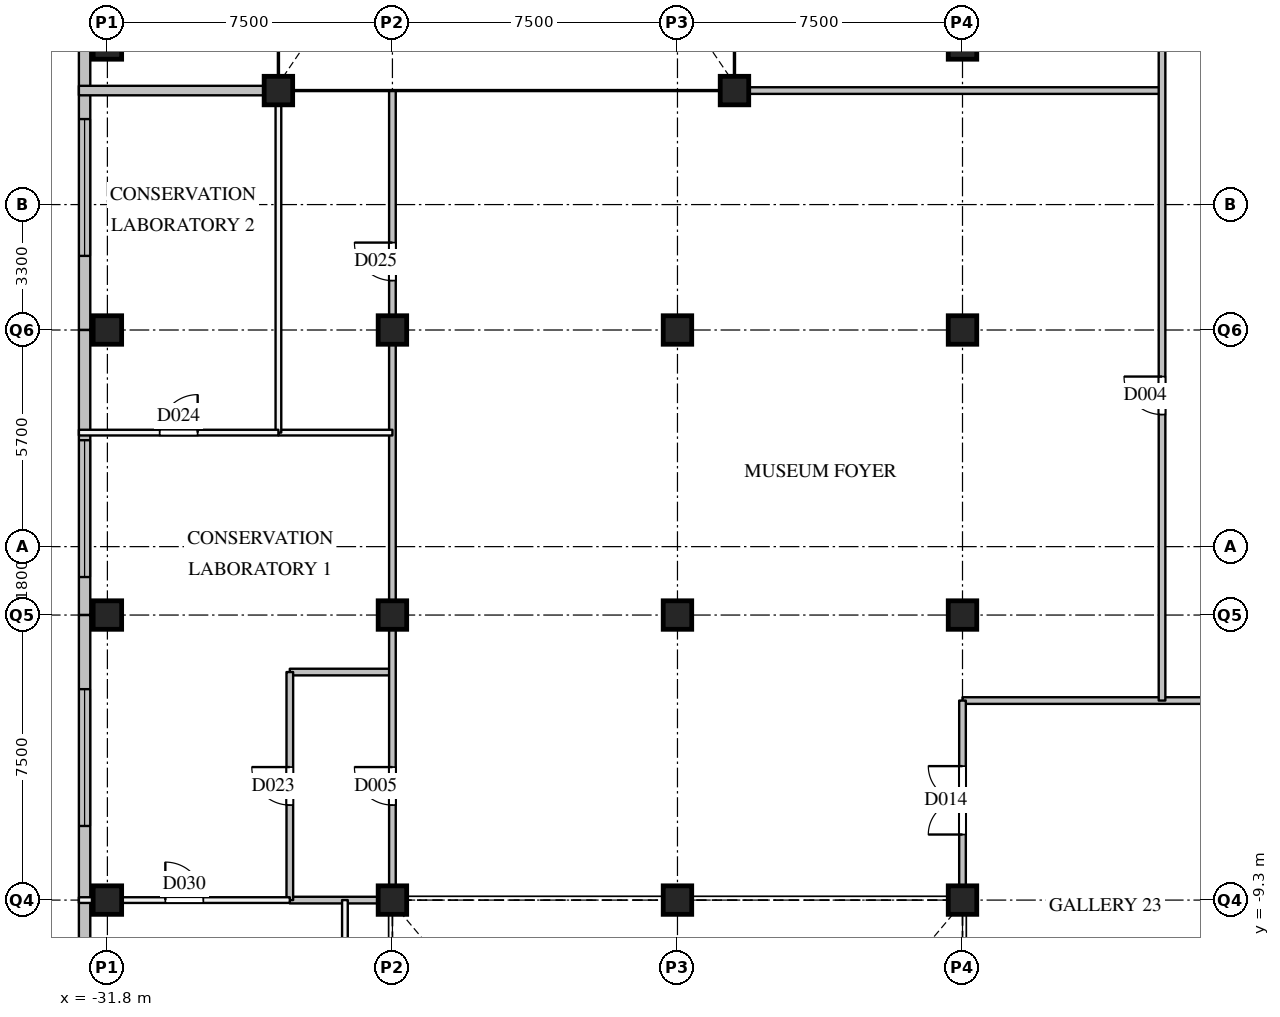
"""IFC4 building model, lengths in metres.
Left out: names, types, materials, properties, quantities, classifications, styles, units other than length and angle.
Written with IfcOpenShell. Run it as: python <this file> out.ifc"""

import sys

from ifc_helpers import new_model, si_unit, direction, frame, frame_2d, origin, origin_2d, place, context, subcontext, project, spatial, rectangle, extrude, element, fill, save


model = new_model("IFC4")
c1 = context("Model", 3, precision=1e-05, world=origin(), true_north=direction((0.0, 1.0)))
c2 = subcontext(c1, "Body", "Model", "MODEL_VIEW")
j1 = project(units=[si_unit("LENGTHUNIT", "METRE"), si_unit("PLANEANGLEUNIT", "RADIAN")], contexts=[c1])
p1 = place(None, origin())
s1 = spatial("IfcSite", under=j1, at=p1, CompositionType="ELEMENT")
p2 = place(p1, origin())
s2 = spatial("IfcBuilding", under=s1, at=p2, CompositionType="ELEMENT")
p3 = place(p2, frame((0.0, 0.0, 21.0)))
s3 = spatial("IfcBuildingStorey", under=s2, at=p3, CompositionType="ELEMENT", Elevation=21.0)
for number, where, z_axis, x_axis in (
    (1, (-31.8, -9.3, 0.0), (0.0, 0.0, 1.0), (1.0, 0.0, 0.0)),
    (2, (-31.8, -1.8, 0.0), (0.0, 0.0, 1.0), (1.0, 0.0, 0.0)),
    (3, (-31.8, 5.7, 0.0), (0.0, 0.0, 1.0), (1.0, 0.0, 0.0)),
    (4, (-31.8, 13.2, 0.0), (0.0, 0.0, 1.0), (1.0, 0.0, 0.0)),
    (5, (-24.3, -9.3, 0.0), (0.0, 0.0, 1.0), (1.0, 0.0, 0.0)),
    (6, (-24.3, -1.8, 0.0), (0.0, 0.0, 1.0), (1.0, 0.0, 0.0)),
    (7, (-24.3, 5.7, 0.0), (0.0, 0.0, 1.0), (1.0, 0.0, 0.0)),
    (8, (-16.8, -9.3, 0.0), (0.0, 0.0, 1.0), (1.0, 0.0, 0.0)),
    (9, (-16.8, -1.8, 0.0), (0.0, 0.0, 1.0), (1.0, 0.0, 0.0)),
    (10, (-16.8, 5.7, 0.0), (0.0, 0.0, 1.0), (1.0, 0.0, 0.0)),
    (11, (-9.3, -9.3, 0.0), (0.0, 0.0, 1.0), (1.0, 0.0, 0.0)),
    (12, (-9.3, -1.8, 0.0), (0.0, 0.0, 1.0), (1.0, 0.0, 0.0)),
    (13, (-9.3, 5.7, 0.0), (0.0, 0.0, 1.0), (1.0, 0.0, 0.0)),
    (14, (-9.3, 13.2, 0.0), (0.0, 0.0, 1.0), (1.0, 0.0, 0.0)),
    (15, (-27.3, 12.0, 0.0), (0.0, 0.0, 1.0), (1.0, 0.0, 0.0)),
    (16, (-15.3, 12.0, 0.0), (0.0, 0.0, 1.0), (1.0, 0.0, 0.0)),
):
    element("IfcColumn", number, at=place(p3, frame(where, z_axis=z_axis, x_axis=x_axis)), inside=s3, PredefinedType="COLUMN", context=c2, shape_type="SweptSolid", body=[
        extrude(rectangle(XDim=0.75, YDim=0.75, at=origin_2d()), origin(), (0.0, 0.0, 1.0), 5.0),
    ])
p4 = place(p3, frame((-32.4, 13.2, 0.0), z_axis=(0.0, 0.0, 1.0), x_axis=(0.0, -1.0, 0.0)))
e17 = element("IfcWall", 17, at=p4, inside=s3, PredefinedType="SOLIDWALL", context=c2, shape_type="SweptSolid", body=[
    extrude(rectangle(XDim=7.5, YDim=0.3, at=frame_2d((3.75, 0.0))), origin(), (0.0, 0.0, 1.0), 4.59),
])
p5 = place(p4, frame((1.95, 0.0, 2.4)))
e18 = element("IfcOpeningElement", 18, at=p5, cuts=e17, PredefinedType="OPENING", context=c2, shape_type="SweptSolid", body=[
    extrude(rectangle(XDim=3.6, YDim=1.2, at=frame_2d((1.8, 0.6))), frame((0.0, 0.16, 0.0), z_axis=(0.0, -1.0, 0.0), x_axis=(1.0, 0.0, 0.0)), (0.0, 0.0, 1.0), 0.32),
])
p6 = place(p3, frame((-32.4, 5.7, 0.0), z_axis=(0.0, 0.0, 1.0), x_axis=(0.0, -1.0, 0.0)))
e19 = element("IfcWall", 19, at=p6, inside=s3, PredefinedType="SOLIDWALL", context=c2, shape_type="SweptSolid", body=[
    extrude(rectangle(XDim=7.5, YDim=0.3, at=frame_2d((3.75, 0.0))), origin(), (0.0, 0.0, 1.0), 4.59),
])
p7 = place(p6, frame((2.9, 0.0, 2.4)))
e20 = element("IfcOpeningElement", 20, at=p7, cuts=e19, PredefinedType="OPENING", context=c2, shape_type="SweptSolid", body=[
    extrude(rectangle(XDim=3.6, YDim=1.2, at=frame_2d((1.8, 0.6))), frame((0.0, 0.16, 0.0), z_axis=(0.0, -1.0, 0.0), x_axis=(1.0, 0.0, 0.0)), (0.0, 0.0, 1.0), 0.32),
])
p8 = place(p3, frame((-32.4, -1.8, 0.0), z_axis=(0.0, 0.0, 1.0), x_axis=(0.0, -1.0, 0.0)))
e21 = element("IfcWall", 21, at=p8, inside=s3, PredefinedType="SOLIDWALL", context=c2, shape_type="SweptSolid", body=[
    extrude(rectangle(XDim=7.5, YDim=0.3, at=frame_2d((3.75, 0.0))), origin(), (0.0, 0.0, 1.0), 4.59),
])
p9 = place(p8, frame((1.95, 0.0, 2.4)))
e22 = element("IfcOpeningElement", 22, at=p9, cuts=e21, PredefinedType="OPENING", context=c2, shape_type="SweptSolid", body=[
    extrude(rectangle(XDim=3.6, YDim=1.2, at=frame_2d((1.8, 0.6))), frame((0.0, 0.16, 0.0), z_axis=(0.0, -1.0, 0.0), x_axis=(1.0, 0.0, 0.0)), (0.0, 0.0, 1.0), 0.32),
])
p10 = place(p3, frame((-32.4, -9.3, 0.0), z_axis=(0.0, 0.0, 1.0), x_axis=(0.0, -1.0, 0.0)))
e23 = element("IfcWall", 23, at=p10, inside=s3, PredefinedType="SOLIDWALL", context=c2, shape_type="SweptSolid", body=[
    extrude(rectangle(XDim=7.5, YDim=0.3, at=frame_2d((3.75, 0.0))), origin(), (0.0, 0.0, 1.0), 4.59),
])
p11 = place(p10, frame((1.95, 0.0, 2.4)))
e24 = element("IfcOpeningElement", 24, at=p11, cuts=e23, PredefinedType="OPENING", context=c2, shape_type="SweptSolid", body=[
    extrude(rectangle(XDim=3.6, YDim=1.2, at=frame_2d((1.8, 0.6))), frame((0.0, 0.16, 0.0), z_axis=(0.0, -1.0, 0.0), x_axis=(1.0, 0.0, 0.0)), (0.0, 0.0, 1.0), 0.32),
])
p12 = place(p3, frame((-27.0, -9.3, 0.0), z_axis=(0.0, 0.0, 1.0), x_axis=(1.0, 0.0, 0.0)))
e25 = element("IfcWall", 25, at=p12, inside=s3, PredefinedType="PARTITIONING", context=c2, shape_type="SweptSolid", body=[
    extrude(rectangle(XDim=2.7, YDim=0.175, at=frame_2d((1.35, 0.0))), origin(), (0.0, 0.0, 1.0), 3.79),
])
p13 = place(p3, frame((-9.3, -4.05, 0.0), z_axis=(0.0, 0.0, 1.0), x_axis=(1.0, 0.0, 0.0)))
e26 = element("IfcWall", 26, at=p13, inside=s3, PredefinedType="PARTITIONING", context=c2, shape_type="SweptSolid", body=[
    extrude(rectangle(XDim=23.25, YDim=0.175, at=frame_2d((11.625, 0.0))), origin(), (0.0, 0.0, 1.0), 3.79),
])
p14 = place(p13, frame((16.725, 0.0, 0.0)))
e27 = element("IfcOpeningElement", 27, at=p14, cuts=e26, PredefinedType="OPENING", context=c2, shape_type="SweptSolid", body=[
    extrude(rectangle(XDim=1.8, YDim=2.1, at=frame_2d((0.9, 1.05))), frame((0.0, 0.097, 0.0), z_axis=(0.0, -1.0, 0.0), x_axis=(1.0, 0.0, 0.0)), (0.0, 0.0, 1.0), 0.195),
])
p15 = place(p3, frame((-27.0, -3.3, 0.0), z_axis=(0.0, 0.0, 1.0), x_axis=(1.0, 0.0, 0.0)))
e28 = element("IfcWall", 28, at=p15, inside=s3, PredefinedType="PARTITIONING", context=c2, shape_type="SweptSolid", body=[
    extrude(rectangle(XDim=2.7, YDim=0.175, at=frame_2d((1.35, 0.0))), origin(), (0.0, 0.0, 1.0), 3.79),
])
p16 = place(p3, frame((-15.3, 12.0, 0.0), z_axis=(0.0, 0.0, 1.0), x_axis=(1.0, 0.0, 0.0)))
e29 = element("IfcWall", 29, at=p16, inside=s3, PredefinedType="PARTITIONING", context=c2, shape_type="SweptSolid", body=[
    extrude(rectangle(XDim=11.25, YDim=0.175, at=frame_2d((5.625, 0.0))), origin(), (0.0, 0.0, 1.0), 3.79),
])
p17 = place(p3, frame((-27.0, -9.3, 0.0), z_axis=(0.0, 0.0, 1.0), x_axis=(0.0, 1.0, 0.0)))
e30 = element("IfcWall", 30, at=p17, inside=s3, PredefinedType="PARTITIONING", context=c2, shape_type="SweptSolid", body=[
    extrude(rectangle(XDim=6.0, YDim=0.175, at=frame_2d((3.0, 0.0))), origin(), (0.0, 0.0, 1.0), 3.79),
])
p18 = place(p17, frame((2.5, 0.0, 0.0)))
e31 = element("IfcOpeningElement", 31, at=p18, cuts=e30, PredefinedType="OPENING", context=c2, shape_type="SweptSolid", body=[
    extrude(rectangle(XDim=1.0, YDim=2.1, at=frame_2d((0.5, 1.05))), frame((0.0, 0.097, 0.0), z_axis=(0.0, -1.0, 0.0), x_axis=(1.0, 0.0, 0.0)), (0.0, 0.0, 1.0), 0.195),
])
p19 = place(p3, frame((-24.3, -9.3, 0.0), z_axis=(0.0, 0.0, 1.0), x_axis=(0.0, 1.0, 0.0)))
e32 = element("IfcWall", 32, at=p19, inside=s3, PredefinedType="PARTITIONING", context=c2, shape_type="SweptSolid", body=[
    extrude(rectangle(XDim=21.3, YDim=0.175, at=frame_2d((10.65, 0.0))), origin(), (0.0, 0.0, 1.0), 3.79),
])
p20 = place(p19, frame((2.5, 0.0, 0.0)))
e33 = element("IfcOpeningElement", 33, at=p20, cuts=e32, PredefinedType="OPENING", context=c2, shape_type="SweptSolid", body=[
    extrude(rectangle(XDim=1.0, YDim=2.1, at=frame_2d((0.5, 1.05))), frame((0.0, 0.097, 0.0), z_axis=(0.0, -1.0, 0.0), x_axis=(1.0, 0.0, 0.0)), (0.0, 0.0, 1.0), 0.195),
])
p21 = place(p19, frame((16.3, 0.0, 0.0)))
e34 = element("IfcOpeningElement", 34, at=p21, cuts=e32, PredefinedType="OPENING", context=c2, shape_type="SweptSolid", body=[
    extrude(rectangle(XDim=1.0, YDim=2.1, at=frame_2d((0.5, 1.05))), frame((0.0, 0.097, 0.0), z_axis=(0.0, -1.0, 0.0), x_axis=(1.0, 0.0, 0.0)), (0.0, 0.0, 1.0), 0.195),
])
p22 = place(p3, frame((-9.3, -9.3, 0.0), z_axis=(0.0, 0.0, 1.0), x_axis=(0.0, 1.0, 0.0)))
e35 = element("IfcWall", 35, at=p22, inside=s3, PredefinedType="PARTITIONING", context=c2, shape_type="SweptSolid", body=[
    extrude(rectangle(XDim=5.25, YDim=0.175, at=frame_2d((2.625, 0.0))), origin(), (0.0, 0.0, 1.0), 3.79),
])
p23 = place(p22, frame((1.725, 0.0, 0.0)))
e36 = element("IfcOpeningElement", 36, at=p23, cuts=e35, PredefinedType="OPENING", context=c2, shape_type="SweptSolid", body=[
    extrude(rectangle(XDim=1.8, YDim=2.1, at=frame_2d((0.9, 1.05))), frame((0.0, 0.097, 0.0), z_axis=(0.0, -1.0, 0.0), x_axis=(1.0, 0.0, 0.0)), (0.0, 0.0, 1.0), 0.195),
])
p24 = place(p3, frame((-4.05, -4.05, 0.0), z_axis=(0.0, 0.0, 1.0), x_axis=(0.0, 1.0, 0.0)))
e37 = element("IfcWall", 37, at=p24, inside=s3, PredefinedType="PARTITIONING", context=c2, shape_type="SweptSolid", body=[
    extrude(rectangle(XDim=63.0, YDim=0.175, at=frame_2d((31.5, 0.0))), origin(), (0.0, 0.0, 1.0), 3.79),
])
p25 = place(p24, frame((52.45, 0.0, 0.0)))
e38 = element("IfcOpeningElement", 38, at=p25, cuts=e37, PredefinedType="OPENING", context=c2, shape_type="SweptSolid", body=[
    extrude(rectangle(XDim=1.0, YDim=2.1, at=frame_2d((0.5, 1.05))), frame((0.0, 0.097, 0.0), z_axis=(0.0, -1.0, 0.0), x_axis=(1.0, 0.0, 0.0)), (0.0, 0.0, 1.0), 0.195),
])
p26 = place(p24, frame((7.525, 0.0, 0.0)))
e39 = element("IfcOpeningElement", 39, at=p26, cuts=e37, PredefinedType="OPENING", context=c2, shape_type="SweptSolid", body=[
    extrude(rectangle(XDim=1.0, YDim=2.1, at=frame_2d((0.5, 1.05))), frame((0.0, 0.097, 0.0), z_axis=(0.0, -1.0, 0.0), x_axis=(1.0, 0.0, 0.0)), (0.0, 0.0, 1.0), 0.195),
])
p27 = place(p24, frame((21.05, 0.0, 0.0)))
e40 = element("IfcOpeningElement", 40, at=p27, cuts=e37, PredefinedType="OPENING", context=c2, shape_type="SweptSolid", body=[
    extrude(rectangle(XDim=1.8, YDim=2.1, at=frame_2d((0.9, 1.05))), frame((0.0, 0.097, 0.0), z_axis=(0.0, -1.0, 0.0), x_axis=(1.0, 0.0, 0.0)), (0.0, 0.0, 1.0), 0.195),
])
p28 = place(p24, frame((32.85, 0.0, 0.0)))
e41 = element("IfcOpeningElement", 41, at=p28, cuts=e37, PredefinedType="OPENING", context=c2, shape_type="SweptSolid", body=[
    extrude(rectangle(XDim=1.8, YDim=2.1, at=frame_2d((0.9, 1.05))), frame((0.0, 0.097, 0.0), z_axis=(0.0, -1.0, 0.0), x_axis=(1.0, 0.0, 0.0)), (0.0, 0.0, 1.0), 0.195),
])
p29 = place(p24, frame((44.65, 0.0, 0.0)))
e42 = element("IfcOpeningElement", 42, at=p29, cuts=e37, PredefinedType="OPENING", context=c2, shape_type="SweptSolid", body=[
    extrude(rectangle(XDim=1.8, YDim=2.1, at=frame_2d((0.9, 1.05))), frame((0.0, 0.097, 0.0), z_axis=(0.0, -1.0, 0.0), x_axis=(1.0, 0.0, 0.0)), (0.0, 0.0, 1.0), 0.195),
])
p30 = place(p3, frame((-27.3, 3.0, 0.0), z_axis=(0.0, 0.0, 1.0), x_axis=(1.0, 0.0, 0.0)))
e43 = element("IfcWall", 43, at=p30, inside=s3, PredefinedType="PARTITIONING", context=c2, shape_type="SweptSolid", body=[
    extrude(rectangle(XDim=3.0, YDim=0.15, at=frame_2d((1.5, 0.0))), origin(), (0.0, 0.0, 1.0), 3.79),
])
p31 = place(p3, frame((-27.3, 3.0, 0.0), z_axis=(0.0, 0.0, 1.0), x_axis=(0.0, 1.0, 0.0)))
e44 = element("IfcWall", 44, at=p31, inside=s3, PredefinedType="PARTITIONING", context=c2, shape_type="SweptSolid", body=[
    extrude(rectangle(XDim=9.0, YDim=0.15, at=frame_2d((4.5, 0.0))), origin(), (0.0, 0.0, 1.0), 3.79),
])
p32 = place(p3, frame((-32.55, -9.3, 0.0), z_axis=(0.0, 0.0, 1.0), x_axis=(1.0, 0.0, 0.0)))
e45 = element("IfcWall", 45, at=p32, inside=s3, PredefinedType="PARTITIONING", context=c2, shape_type="SweptSolid", body=[
    extrude(rectangle(XDim=5.55, YDim=0.15, at=frame_2d((2.775, 0.0))), origin(), (0.0, 0.0, 1.0), 3.79),
])
p33 = place(p32, frame((2.275, 0.0, 0.0)))
e46 = element("IfcOpeningElement", 46, at=p33, cuts=e45, PredefinedType="OPENING", context=c2, shape_type="SweptSolid", body=[
    extrude(rectangle(XDim=1.0, YDim=2.1, at=frame_2d((0.5, 1.05))), frame((0.0, 0.085, 0.0), z_axis=(0.0, -1.0, 0.0), x_axis=(1.0, 0.0, 0.0)), (0.0, 0.0, 1.0), 0.17),
])
p34 = place(p3, frame((-32.55, 3.0, 0.0), z_axis=(0.0, 0.0, 1.0), x_axis=(1.0, 0.0, 0.0)))
e47 = element("IfcWall", 47, at=p34, inside=s3, PredefinedType="PARTITIONING", context=c2, shape_type="SweptSolid", body=[
    extrude(rectangle(XDim=5.25, YDim=0.15, at=frame_2d((2.625, 0.0))), origin(), (0.0, 0.0, 1.0), 3.79),
])
p35 = place(p34, frame((2.125, 0.0, 0.0)))
e48 = element("IfcOpeningElement", 48, at=p35, cuts=e47, PredefinedType="OPENING", context=c2, shape_type="SweptSolid", body=[
    extrude(rectangle(XDim=1.0, YDim=2.1, at=frame_2d((0.5, 1.05))), frame((0.0, 0.085, 0.0), z_axis=(0.0, -1.0, 0.0), x_axis=(1.0, 0.0, 0.0)), (0.0, 0.0, 1.0), 0.17),
])
p36 = place(p3, frame((-25.55, -20.95, 0.0), z_axis=(0.0, 0.0, 1.0), x_axis=(0.0, 1.0, 0.0)))
e49 = element("IfcWall", 49, at=p36, inside=s3, PredefinedType="PARTITIONING", context=c2, shape_type="SweptSolid", body=[
    extrude(rectangle(XDim=11.65, YDim=0.15, at=frame_2d((5.825, 0.0))), origin(), (0.0, 0.0, 1.0), 3.79),
])
p37 = place(p36, frame((5.325, 0.0, 0.0)))
e50 = element("IfcOpeningElement", 50, at=p37, cuts=e49, PredefinedType="OPENING", context=c2, shape_type="SweptSolid", body=[
    extrude(rectangle(XDim=1.0, YDim=2.1, at=frame_2d((0.5, 1.05))), frame((0.0, 0.085, 0.0), z_axis=(0.0, -1.0, 0.0), x_axis=(1.0, 0.0, 0.0)), (0.0, 0.0, 1.0), 0.17),
])
p38 = place(p3, frame((-32.55, 12.0, 0.0), z_axis=(0.0, 0.0, 1.0), x_axis=(1.0, 0.0, 0.0)))
e51 = element("IfcWall", 51, at=p38, inside=s3, PredefinedType="PARTITIONING", context=c2, shape_type="SweptSolid", body=[
    extrude(rectangle(XDim=5.25, YDim=0.25, at=frame_2d((2.625, 0.0))), origin(), (0.0, 0.0, 1.0), 3.79),
])
p39 = place(p5, origin())
e52 = element("IfcWindow", 52, at=p39, inside=s3, PartitioningType="SINGLE_PANEL", PredefinedType="WINDOW", context=c2, shape_type="SweptSolid", body=[
    extrude(rectangle(XDim=3.6, YDim=1.2, at=frame_2d((1.8, 0.6))), frame((0.0, 0.03, 0.0), z_axis=(0.0, -1.0, 0.0), x_axis=(1.0, 0.0, 0.0)), (0.0, 0.0, 1.0), 0.06),
])
fill(e18, e52)
p40 = place(p7, origin())
e53 = element("IfcWindow", 53, at=p40, inside=s3, PartitioningType="SINGLE_PANEL", PredefinedType="WINDOW", context=c2, shape_type="SweptSolid", body=[
    extrude(rectangle(XDim=3.6, YDim=1.2, at=frame_2d((1.8, 0.6))), frame((0.0, 0.03, 0.0), z_axis=(0.0, -1.0, 0.0), x_axis=(1.0, 0.0, 0.0)), (0.0, 0.0, 1.0), 0.06),
])
fill(e20, e53)
p41 = place(p9, origin())
e54 = element("IfcWindow", 54, at=p41, inside=s3, PartitioningType="SINGLE_PANEL", PredefinedType="WINDOW", context=c2, shape_type="SweptSolid", body=[
    extrude(rectangle(XDim=3.6, YDim=1.2, at=frame_2d((1.8, 0.6))), frame((0.0, 0.03, 0.0), z_axis=(0.0, -1.0, 0.0), x_axis=(1.0, 0.0, 0.0)), (0.0, 0.0, 1.0), 0.06),
])
fill(e22, e54)
p42 = place(p26, origin())
e55 = element("IfcDoor", 55, at=p42, inside=s3, OperationType="SINGLE_SWING_RIGHT", PredefinedType="DOOR", context=c2, shape_type="SweptSolid", body=[
    extrude(rectangle(XDim=1.0, YDim=2.1, at=frame_2d((0.5, 1.05))), frame((0.0, 0.025, 0.0), z_axis=(0.0, -1.0, 0.0), x_axis=(1.0, 0.0, 0.0)), (0.0, 0.0, 1.0), 0.05),
])
fill(e39, e55)
p43 = place(p20, origin())
e56 = element("IfcDoor", 56, at=p43, inside=s3, OperationType="SINGLE_SWING_RIGHT", PredefinedType="DOOR", context=c2, shape_type="SweptSolid", body=[
    extrude(rectangle(XDim=1.0, YDim=2.1, at=frame_2d((0.5, 1.05))), frame((0.0, 0.025, 0.0), z_axis=(0.0, -1.0, 0.0), x_axis=(1.0, 0.0, 0.0)), (0.0, 0.0, 1.0), 0.05),
])
fill(e33, e56)
p44 = place(p23, origin())
e57 = element("IfcDoor", 57, at=p44, inside=s3, OperationType="DOUBLE_DOOR_SINGLE_SWING", PredefinedType="DOOR", context=c2, shape_type="SweptSolid", body=[
    extrude(rectangle(XDim=1.8, YDim=2.1, at=frame_2d((0.9, 1.05))), frame((0.0, 0.025, 0.0), z_axis=(0.0, -1.0, 0.0), x_axis=(1.0, 0.0, 0.0)), (0.0, 0.0, 1.0), 0.05),
])
fill(e36, e57)
p45 = place(p18, origin())
e58 = element("IfcDoor", 58, at=p45, inside=s3, OperationType="SINGLE_SWING_RIGHT", PredefinedType="DOOR", context=c2, shape_type="SweptSolid", body=[
    extrude(rectangle(XDim=1.0, YDim=2.1, at=frame_2d((0.5, 1.05))), frame((0.0, 0.025, 0.0), z_axis=(0.0, -1.0, 0.0), x_axis=(1.0, 0.0, 0.0)), (0.0, 0.0, 1.0), 0.05),
])
fill(e31, e58)
p46 = place(p35, origin())
e59 = element("IfcDoor", 59, at=p46, inside=s3, OperationType="SINGLE_SWING_RIGHT", PredefinedType="DOOR", context=c2, shape_type="SweptSolid", body=[
    extrude(rectangle(XDim=1.0, YDim=2.1, at=frame_2d((0.5, 1.05))), frame((0.0, 0.025, 0.0), z_axis=(0.0, -1.0, 0.0), x_axis=(1.0, 0.0, 0.0)), (0.0, 0.0, 1.0), 0.05),
])
fill(e48, e59)
p47 = place(p21, origin())
e60 = element("IfcDoor", 60, at=p47, inside=s3, OperationType="SINGLE_SWING_RIGHT", PredefinedType="DOOR", context=c2, shape_type="SweptSolid", body=[
    extrude(rectangle(XDim=1.0, YDim=2.1, at=frame_2d((0.5, 1.05))), frame((0.0, 0.025, 0.0), z_axis=(0.0, -1.0, 0.0), x_axis=(1.0, 0.0, 0.0)), (0.0, 0.0, 1.0), 0.05),
])
fill(e34, e60)
p48 = place(p33, origin())
e61 = element("IfcDoor", 61, at=p48, inside=s3, OperationType="SINGLE_SWING_LEFT", PredefinedType="DOOR", context=c2, shape_type="SweptSolid", body=[
    extrude(rectangle(XDim=1.0, YDim=2.1, at=frame_2d((0.5, 1.05))), frame((0.0, 0.025, 0.0), z_axis=(0.0, -1.0, 0.0), x_axis=(1.0, 0.0, 0.0)), (0.0, 0.0, 1.0), 0.05),
])
fill(e46, e61)
save(model, sys.argv[1])
